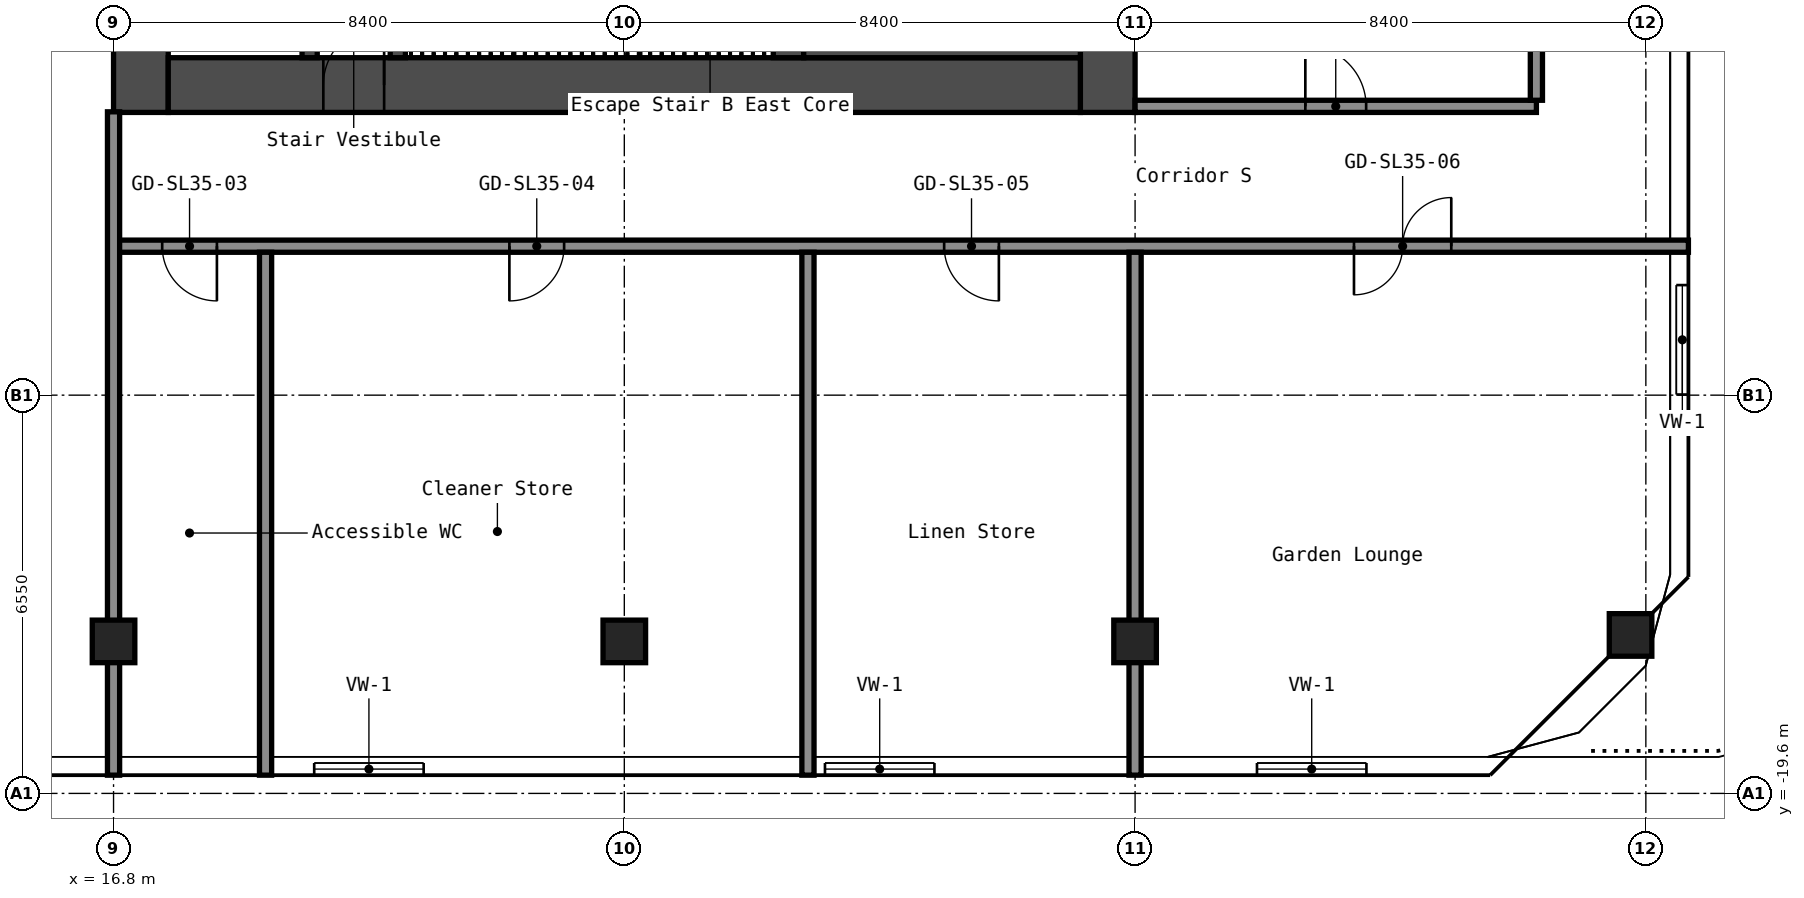
"""IFC4 building model, lengths in metres.
Left out: names, types, materials, properties, quantities, classifications, styles, units other than length and angle.
Written with IfcOpenShell. Run it as: python <this file> out.ifc"""

import sys

from ifc_helpers import new_model, si_unit, direction, frame, frame_2d, origin, origin_2d, place, context, subcontext, project, spatial, rectangle, hollow_rectangle, extrude, element, fill, save


model = new_model("IFC4")
c1 = context("Model", 3, precision=1e-05, world=origin(), true_north=direction((0.0, 1.0)))
c2 = subcontext(c1, "Body", "Model", "MODEL_VIEW")
j1 = project(units=[si_unit("LENGTHUNIT", "METRE"), si_unit("PLANEANGLEUNIT", "RADIAN")], contexts=[c1])
p1 = place(None, origin())
s1 = spatial("IfcSite", under=j1, at=p1, CompositionType="ELEMENT")
p2 = place(p1, origin())
s2 = spatial("IfcBuilding", under=s1, at=p2, CompositionType="ELEMENT")
p3 = place(p2, frame((0.0, 0.0, 124.6)))
s3 = spatial("IfcBuildingStorey", under=s2, at=p3, CompositionType="ELEMENT", Elevation=124.6)
for number, where, z_axis, x_axis in (
    (1, (16.8, -17.1, 0.0), (0.0, 0.0, 1.0), (1.0, 0.0, 0.0)),
    (2, (25.2, -17.1, 0.0), (0.0, 0.0, 1.0), (1.0, 0.0, 0.0)),
    (3, (33.6, -17.1, 0.0), (0.0, 0.0, 1.0), (1.0, 0.0, 0.0)),
    (4, (41.749, -16.994, 0.0), (0.0, 0.0, 1.0), (1.0, 0.0, 0.0)),
):
    element("IfcColumn", number, at=place(p3, frame(where, z_axis=z_axis, x_axis=x_axis)), inside=s3, PredefinedType="COLUMN", context=c2, shape_type="SweptSolid", body=[
        extrude(hollow_rectangle(XDim=0.7, YDim=0.7, WallThickness=0.028, at=origin_2d()), origin(), (0.0, 0.0, 1.0), 5.95),
    ])
p4 = place(p3, frame((17.25, -8.4, 0.0), z_axis=(0.0, 0.0, 1.0), x_axis=(0.0, 1.0, 0.0)))
e5 = element("IfcWall", 5, at=p4, inside=s3, PredefinedType="SHEAR", context=c2, shape_type="SweptSolid", body=[
    extrude(rectangle(XDim=16.8, YDim=0.9, at=frame_2d((8.4, 0.0))), origin(), (0.0, 0.0, 1.0), 5.95),
])
p5 = place(p4, frame((7.1, 0.0, 0.0)))
e6 = element("IfcOpeningElement", 6, at=p5, cuts=e5, PredefinedType="OPENING", context=c2, shape_type="SweptSolid", body=[
    extrude(rectangle(XDim=1.6, YDim=2.1, at=frame_2d((0.8, 1.05))), frame((0.0, 0.46, 0.0), z_axis=(0.0, -1.0, 0.0), x_axis=(1.0, 0.0, 0.0)), (0.0, 0.0, 1.0), 0.92),
])
p6 = place(p3, frame((33.15, -8.4, 0.0), z_axis=(0.0, 0.0, 1.0), x_axis=(0.0, 1.0, 0.0)))
e7 = element("IfcWall", 7, at=p6, inside=s3, PredefinedType="SHEAR", context=c2, shape_type="SweptSolid", body=[
    extrude(rectangle(XDim=16.8, YDim=0.9, at=frame_2d((8.4, 0.0))), origin(), (0.0, 0.0, 1.0), 5.95),
])
p7 = place(p3, frame((17.7, -7.95, 0.0), z_axis=(0.0, 0.0, 1.0), x_axis=(1.0, 0.0, 0.0)))
e8 = element("IfcWall", 8, at=p7, inside=s3, PredefinedType="SHEAR", context=c2, shape_type="SweptSolid", body=[
    extrude(rectangle(XDim=15.0, YDim=0.9, at=frame_2d((7.5, 0.0))), origin(), (0.0, 0.0, 1.0), 5.95),
])
p8 = place(p7, frame((2.55, 0.0, 0.0)))
e9 = element("IfcOpeningElement", 9, at=p8, cuts=e8, PredefinedType="OPENING", context=c2, shape_type="SweptSolid", body=[
    extrude(rectangle(XDim=1.0, YDim=2.1, at=frame_2d((0.5, 1.05))), frame((0.0, 0.46, 0.0), z_axis=(0.0, -1.0, 0.0), x_axis=(1.0, 0.0, 0.0)), (0.0, 0.0, 1.0), 0.92),
])
p9 = place(p3, frame((20.025, -7.5, 0.0), z_axis=(0.0, 0.0, 1.0), x_axis=(0.0, 1.0, 0.0)))
e10 = element("IfcWall", 10, at=p9, inside=s3, PredefinedType="SHEAR", context=c2, shape_type="SweptSolid", body=[
    extrude(rectangle(XDim=6.3, YDim=0.25, at=frame_2d((3.15, 0.0))), origin(), (0.0, 0.0, 1.0), 5.95),
])
p10 = place(p9, frame((2.4, 0.0, 0.0)))
e11 = element("IfcOpeningElement", 11, at=p10, cuts=e10, PredefinedType="OPENING", context=c2, shape_type="SweptSolid", body=[
    extrude(rectangle(XDim=1.0, YDim=2.1, at=frame_2d((0.5, 1.05))), frame((0.0, 0.135, 0.0), z_axis=(0.0, -1.0, 0.0), x_axis=(1.0, 0.0, 0.0)), (0.0, 0.0, 1.0), 0.27),
])
p11 = place(p3, frame((21.475, -7.5, 0.0), z_axis=(0.0, 0.0, 1.0), x_axis=(0.0, 1.0, 0.0)))
e12 = element("IfcWall", 12, at=p11, inside=s3, PredefinedType="SHEAR", context=c2, shape_type="SweptSolid", body=[
    extrude(rectangle(XDim=3.75, YDim=0.25, at=frame_2d((1.875, 0.0))), origin(), (0.0, 0.0, 1.0), 5.95),
])
p12 = place(p11, frame((1.3, 0.0, 0.0)))
e13 = element("IfcOpeningElement", 13, at=p12, cuts=e12, PredefinedType="OPENING", context=c2, shape_type="SweptSolid", body=[
    extrude(rectangle(XDim=1.2, YDim=2.1, at=frame_2d((0.6, 1.05))), frame((0.0, 0.135, 0.0), z_axis=(0.0, -1.0, 0.0), x_axis=(1.0, 0.0, 0.0)), (0.0, 0.0, 1.0), 0.27),
])
p13 = place(p3, frame((27.9, -7.5, 0.0), z_axis=(0.0, 0.0, 1.0), x_axis=(0.0, 1.0, 0.0)))
e14 = element("IfcWall", 14, at=p13, inside=s3, PredefinedType="SHEAR", context=c2, shape_type="SweptSolid", body=[
    extrude(rectangle(XDim=3.75, YDim=0.5, at=frame_2d((1.875, 0.0))), origin(), (0.0, 0.0, 1.0), 5.95),
])
p14 = place(p3, frame((28.15, -6.75, 0.0), z_axis=(0.0, 0.0, 1.0), x_axis=(1.0, 0.0, 0.0)))
e15 = element("IfcWall", 15, at=p14, inside=s3, PredefinedType="SHEAR", context=c2, shape_type="SweptSolid", body=[
    extrude(rectangle(XDim=4.55, YDim=1.5, at=frame_2d((2.275, 0.0))), origin(), (0.0, 0.0, 1.0), 5.95),
])
p15 = place(p3, frame((16.8, -10.6, 0.0), z_axis=(0.0, 0.0, 1.0), x_axis=(1.0, 0.0, 0.0)))
e16 = element("IfcWall", 16, at=p15, inside=s3, PredefinedType="PARTITIONING", context=c2, shape_type="SweptSolid", body=[
    extrude(rectangle(XDim=25.9, YDim=0.2, at=frame_2d((12.95, 0.0))), origin(), (0.0, 0.0, 1.0), 5.95),
])
p16 = place(p15, frame((0.8, 0.0, 0.0)))
e17 = element("IfcOpeningElement", 17, at=p16, cuts=e16, PredefinedType="OPENING", context=c2, shape_type="SweptSolid", body=[
    extrude(rectangle(XDim=0.9, YDim=2.1, at=frame_2d((0.45, 1.05))), frame((0.0, 0.11, 0.0), z_axis=(0.0, -1.0, 0.0), x_axis=(1.0, 0.0, 0.0)), (0.0, 0.0, 1.0), 0.22),
])
p17 = place(p15, frame((6.51, 0.0, 0.0)))
e18 = element("IfcOpeningElement", 18, at=p17, cuts=e16, PredefinedType="OPENING", context=c2, shape_type="SweptSolid", body=[
    extrude(rectangle(XDim=0.9, YDim=2.1, at=frame_2d((0.45, 1.05))), frame((0.0, 0.11, 0.0), z_axis=(0.0, -1.0, 0.0), x_axis=(1.0, 0.0, 0.0)), (0.0, 0.0, 1.0), 0.22),
])
p18 = place(p15, frame((13.66, 0.0, 0.0)))
e19 = element("IfcOpeningElement", 19, at=p18, cuts=e16, PredefinedType="OPENING", context=c2, shape_type="SweptSolid", body=[
    extrude(rectangle(XDim=0.9, YDim=2.1, at=frame_2d((0.45, 1.05))), frame((0.0, 0.11, 0.0), z_axis=(0.0, -1.0, 0.0), x_axis=(1.0, 0.0, 0.0)), (0.0, 0.0, 1.0), 0.22),
])
p19 = place(p15, frame((20.4, 0.0, 0.0)))
e20 = element("IfcOpeningElement", 20, at=p19, cuts=e16, PredefinedType="OPENING", context=c2, shape_type="SweptSolid", body=[
    extrude(rectangle(XDim=1.6, YDim=2.1, at=frame_2d((0.8, 1.05))), frame((0.0, 0.11, 0.0), z_axis=(0.0, -1.0, 0.0), x_axis=(1.0, 0.0, 0.0)), (0.0, 0.0, 1.0), 0.22),
])
p20 = place(p3, frame((33.6, -8.3, 0.0), z_axis=(0.0, 0.0, 1.0), x_axis=(1.0, 0.0, 0.0)))
e21 = element("IfcWall", 21, at=p20, inside=s3, PredefinedType="PARTITIONING", context=c2, shape_type="SweptSolid", body=[
    extrude(rectangle(XDim=6.6, YDim=0.2, at=frame_2d((3.3, 0.0))), origin(), (0.0, 0.0, 1.0), 5.95),
])
p21 = place(p20, frame((2.8, 0.0, 0.0)))
e22 = element("IfcOpeningElement", 22, at=p21, cuts=e21, PredefinedType="OPENING", context=c2, shape_type="SweptSolid", body=[
    extrude(rectangle(XDim=1.0, YDim=2.1, at=frame_2d((0.5, 1.05))), frame((0.0, 0.11, 0.0), z_axis=(0.0, -1.0, 0.0), x_axis=(1.0, 0.0, 0.0)), (0.0, 0.0, 1.0), 0.22),
])
p22 = place(p3, frame((16.8, -19.3, 0.0), z_axis=(0.0, 0.0, 1.0), x_axis=(0.0, 1.0, 0.0)))
e23 = element("IfcWall", 23, at=p22, inside=s3, PredefinedType="PARTITIONING", context=c2, shape_type="SweptSolid", body=[
    extrude(rectangle(XDim=10.91, YDim=0.2, at=frame_2d((5.455, 0.0))), origin(), (0.0, 0.0, 1.0), 5.95),
])
for number, where, z_axis, x_axis in (
    (24, (19.3, -19.3, 0.0), (0.0, 0.0, 1.0), (0.0, 1.0, 0.0)),
    (25, (28.22, -19.3, 0.0), (0.0, 0.0, 1.0), (0.0, 1.0, 0.0)),
    (26, (33.6, -19.3, 0.0), (0.0, 0.0, 1.0), (0.0, 1.0, 0.0)),
):
    element("IfcWall", number, at=place(p3, frame(where, z_axis=z_axis, x_axis=x_axis)), inside=s3, PredefinedType="PARTITIONING", context=c2, shape_type="SweptSolid", body=[
        extrude(rectangle(XDim=8.6, YDim=0.2, at=frame_2d((4.3, 0.0))), origin(), (0.0, 0.0, 1.0), 5.95),
    ])
p23 = place(p3, frame((40.2, -8.2, 0.0), z_axis=(0.0, 0.0, 1.0), x_axis=(0.0, 1.0, 0.0)))
e27 = element("IfcWall", 27, at=p23, inside=s3, PredefinedType="PARTITIONING", context=c2, shape_type="SweptSolid", body=[
    extrude(rectangle(XDim=16.4, YDim=0.2, at=frame_2d((8.2, 0.0))), origin(), (0.0, 0.0, 1.0), 5.95),
])
p24 = place(p3, frame((42.6, -16.01, 4.45), z_axis=(0.0, 0.0, 1.0), x_axis=(0.0, 1.0, 0.0)))
p25 = place(p24, frame((2.97, 0.0, 0.25)))
p26 = place(p25, origin())
e28 = element("IfcWindow", 28, at=p26, inside=s3, PartitioningType="SINGLE_PANEL", PredefinedType="WINDOW", context=c2, shape_type="SweptSolid", body=[
    extrude(rectangle(XDim=1.8, YDim=0.9, at=frame_2d((0.9, 0.45))), frame((0.0, 0.03, 0.0), z_axis=(0.0, -1.0, 0.0), x_axis=(1.0, 0.0, 0.0)), (0.0, 0.0, 1.0), 0.06),
])
p27 = place(p3, frame((16.8, -19.2, 4.45), z_axis=(0.0, 0.0, 1.0), x_axis=(1.0, 0.0, 0.0)))
p28 = place(p27, frame((3.3, 0.0, 0.25)))
p29 = place(p28, origin())
e29 = element("IfcWindow", 29, at=p29, inside=s3, PartitioningType="SINGLE_PANEL", PredefinedType="WINDOW", context=c2, shape_type="SweptSolid", body=[
    extrude(rectangle(XDim=1.8, YDim=0.9, at=frame_2d((0.9, 0.45))), frame((0.0, 0.03, 0.0), z_axis=(0.0, -1.0, 0.0), x_axis=(1.0, 0.0, 0.0)), (0.0, 0.0, 1.0), 0.06),
])
p30 = place(p3, frame((25.2, -19.2, 4.45), z_axis=(0.0, 0.0, 1.0), x_axis=(1.0, 0.0, 0.0)))
p31 = place(p30, frame((3.3, 0.0, 0.25)))
p32 = place(p31, origin())
e30 = element("IfcWindow", 30, at=p32, inside=s3, PartitioningType="SINGLE_PANEL", PredefinedType="WINDOW", context=c2, shape_type="SweptSolid", body=[
    extrude(rectangle(XDim=1.8, YDim=0.9, at=frame_2d((0.9, 0.45))), frame((0.0, 0.03, 0.0), z_axis=(0.0, -1.0, 0.0), x_axis=(1.0, 0.0, 0.0)), (0.0, 0.0, 1.0), 0.06),
])
p33 = place(p3, frame((33.6, -19.2, 4.45), z_axis=(0.0, 0.0, 1.0), x_axis=(1.0, 0.0, 0.0)))
p34 = place(p33, frame((2.005, 0.0, 0.25)))
p35 = place(p34, origin())
e31 = element("IfcWindow", 31, at=p35, inside=s3, PartitioningType="SINGLE_PANEL", PredefinedType="WINDOW", context=c2, shape_type="SweptSolid", body=[
    extrude(rectangle(XDim=1.8, YDim=0.9, at=frame_2d((0.9, 0.45))), frame((0.0, 0.03, 0.0), z_axis=(0.0, -1.0, 0.0), x_axis=(1.0, 0.0, 0.0)), (0.0, 0.0, 1.0), 0.06),
])
p36 = place(p8, origin())
e32 = element("IfcDoor", 32, at=p36, inside=s3, OperationType="SINGLE_SWING_LEFT", PredefinedType="DOOR", context=c2, shape_type="SweptSolid", body=[
    extrude(rectangle(XDim=1.0, YDim=2.1, at=frame_2d((0.5, 1.05))), frame((0.0, 0.025, 0.0), z_axis=(0.0, -1.0, 0.0), x_axis=(1.0, 0.0, 0.0)), (0.0, 0.0, 1.0), 0.05),
])
fill(e9, e32)
p37 = place(p16, origin())
e33 = element("IfcDoor", 33, at=p37, inside=s3, OperationType="SINGLE_SWING_RIGHT", PredefinedType="DOOR", context=c2, shape_type="SweptSolid", body=[
    extrude(rectangle(XDim=0.9, YDim=2.1, at=frame_2d((0.45, 1.05))), frame((0.0, 0.025, 0.0), z_axis=(0.0, -1.0, 0.0), x_axis=(1.0, 0.0, 0.0)), (0.0, 0.0, 1.0), 0.05),
])
fill(e17, e33)
p38 = place(p17, origin())
e34 = element("IfcDoor", 34, at=p38, inside=s3, OperationType="SINGLE_SWING_LEFT", PredefinedType="DOOR", context=c2, shape_type="SweptSolid", body=[
    extrude(rectangle(XDim=0.9, YDim=2.1, at=frame_2d((0.45, 1.05))), frame((0.0, 0.025, 0.0), z_axis=(0.0, -1.0, 0.0), x_axis=(1.0, 0.0, 0.0)), (0.0, 0.0, 1.0), 0.05),
])
fill(e18, e34)
p39 = place(p18, origin())
e35 = element("IfcDoor", 35, at=p39, inside=s3, OperationType="SINGLE_SWING_RIGHT", PredefinedType="DOOR", context=c2, shape_type="SweptSolid", body=[
    extrude(rectangle(XDim=0.9, YDim=2.1, at=frame_2d((0.45, 1.05))), frame((0.0, 0.025, 0.0), z_axis=(0.0, -1.0, 0.0), x_axis=(1.0, 0.0, 0.0)), (0.0, 0.0, 1.0), 0.05),
])
fill(e19, e35)
p40 = place(p19, origin())
e36 = element("IfcDoor", 36, at=p40, inside=s3, OperationType="DOUBLE_DOOR_SINGLE_SWING", PredefinedType="DOOR", context=c2, shape_type="SweptSolid", body=[
    extrude(rectangle(XDim=1.6, YDim=2.1, at=frame_2d((0.8, 1.05))), frame((0.0, 0.025, 0.0), z_axis=(0.0, -1.0, 0.0), x_axis=(1.0, 0.0, 0.0)), (0.0, 0.0, 1.0), 0.05),
])
fill(e20, e36)
p41 = place(p21, origin())
e37 = element("IfcDoor", 37, at=p41, inside=s3, OperationType="SINGLE_SWING_RIGHT", PredefinedType="DOOR", context=c2, shape_type="SweptSolid", body=[
    extrude(rectangle(XDim=1.0, YDim=2.1, at=frame_2d((0.5, 1.05))), frame((0.0, 0.025, 0.0), z_axis=(0.0, -1.0, 0.0), x_axis=(1.0, 0.0, 0.0)), (0.0, 0.0, 1.0), 0.05),
])
fill(e22, e37)
save(model, sys.argv[1])
